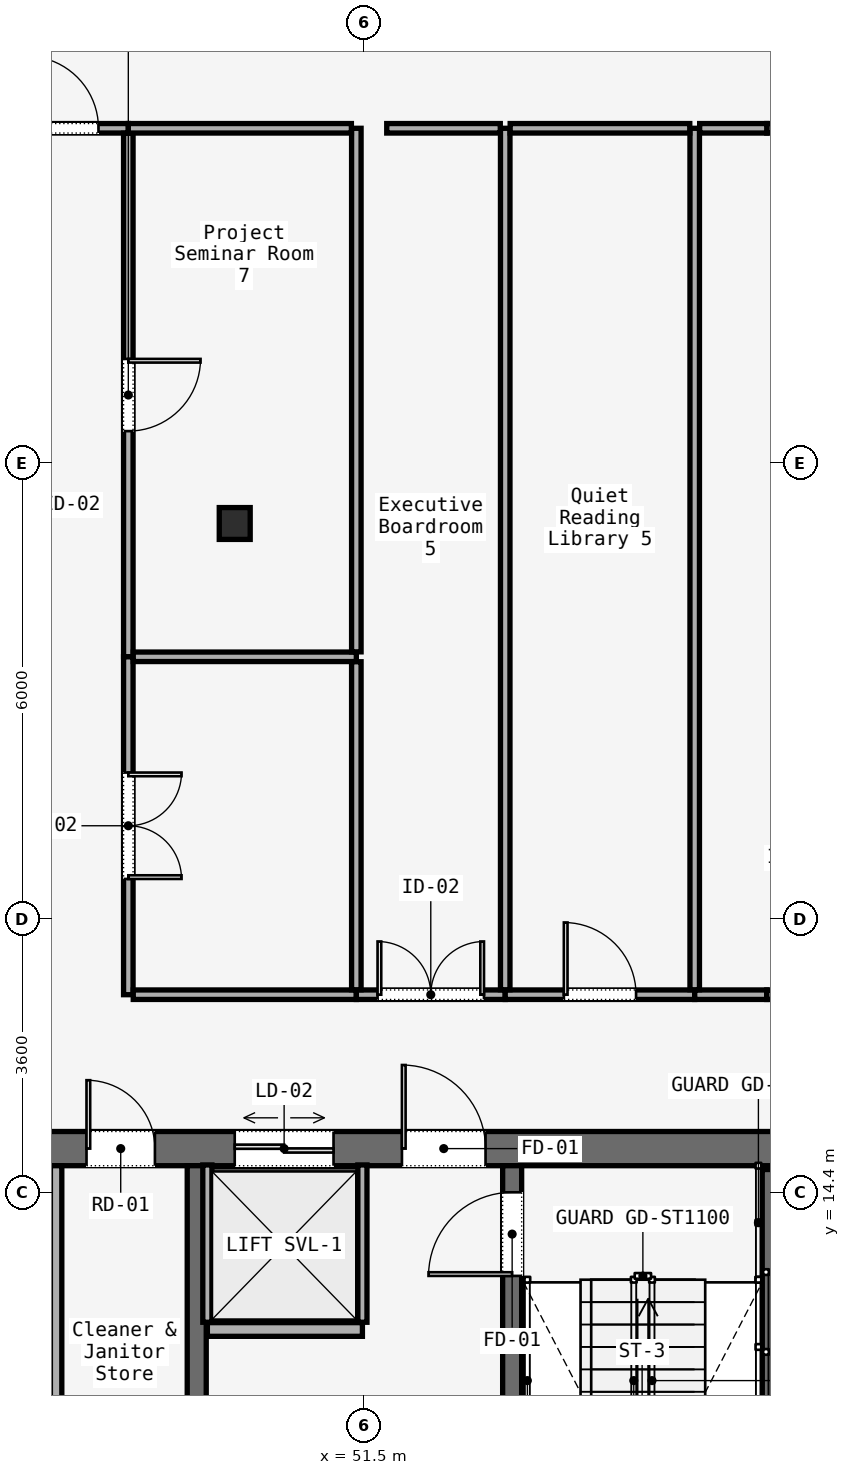
"""IFC4 building model, lengths in metres.
Left out: names, types, materials, properties, quantities, classifications, styles, units other than length and angle.
Written with IfcOpenShell. Run it as: python <this file> out.ifc"""

import sys

from ifc_helpers import new_model, si_unit, direction, frame, frame_2d, origin, origin_2d, place, context, subcontext, project, spatial, rectangle, i_section, extrude, element, fill, save


model = new_model("IFC4")
c1 = context("Model", 3, precision=1e-05, world=origin(), true_north=direction((0.0, 1.0)))
c2 = subcontext(c1, "Body", "Model", "MODEL_VIEW")
j1 = project(units=[si_unit("LENGTHUNIT", "METRE"), si_unit("PLANEANGLEUNIT", "RADIAN")], contexts=[c1])
p1 = place(None, origin())
s1 = spatial("IfcSite", under=j1, at=p1, CompositionType="ELEMENT")
p2 = place(p1, origin())
s2 = spatial("IfcBuilding", under=s1, at=p2, CompositionType="ELEMENT")
p3 = place(p2, frame((0.0, 0.0, 146.0)))
s3 = spatial("IfcBuildingStorey", under=s2, at=p3, CompositionType="ELEMENT", Elevation=146.0)
p4 = place(p3, frame((26.45, 14.975, 0.0), z_axis=(0.0, 0.0, 1.0), x_axis=(1.0, 0.0, 0.0)))
e1 = element("IfcWall", 1, at=p4, inside=s3, PredefinedType="SOLIDWALL", context=c2, shape_type="SweptSolid", body=[
    extrude(rectangle(XDim=31.1, YDim=0.45, at=frame_2d((15.55, 0.0))), origin(), (0.0, 0.0, 1.0), 3.58),
])
p5 = place(p4, frame((1.65, 0.0, 0.0)))
e2 = element("IfcOpeningElement", 2, at=p5, cuts=e1, PredefinedType="OPENING", context=c2, shape_type="SweptSolid", body=[
    extrude(rectangle(XDim=1.1, YDim=2.2, at=frame_2d((0.55, 1.1))), frame((0.0, 0.225, 0.0), z_axis=(0.0, -1.0, 0.0), x_axis=(1.0, 0.0, 0.0)), (0.0, 0.0, 1.0), 0.45),
])
p6 = place(p4, frame((13.65, 0.0, 0.0)))
e3 = element("IfcOpeningElement", 3, at=p6, cuts=e1, PredefinedType="OPENING", context=c2, shape_type="SweptSolid", body=[
    extrude(rectangle(XDim=1.1, YDim=2.2, at=frame_2d((0.55, 1.1))), frame((0.0, 0.225, 0.0), z_axis=(0.0, -1.0, 0.0), x_axis=(1.0, 0.0, 0.0)), (0.0, 0.0, 1.0), 0.45),
])
p7 = place(p4, frame((25.55, 0.0, 0.0)))
e4 = element("IfcOpeningElement", 4, at=p7, cuts=e1, PredefinedType="OPENING", context=c2, shape_type="SweptSolid", body=[
    extrude(rectangle(XDim=1.1, YDim=2.2, at=frame_2d((0.55, 1.1))), frame((0.0, 0.225, 0.0), z_axis=(0.0, -1.0, 0.0), x_axis=(1.0, 0.0, 0.0)), (0.0, 0.0, 1.0), 0.45),
])
p8 = place(p4, frame((10.7, 0.0, 0.0)))
e5 = element("IfcOpeningElement", 5, at=p8, cuts=e1, PredefinedType="OPENING", context=c2, shape_type="SweptSolid", body=[
    extrude(rectangle(XDim=1.4, YDim=2.2, at=frame_2d((0.7, 1.1))), frame((0.0, 0.225, 0.0), z_axis=(0.0, -1.0, 0.0), x_axis=(1.0, 0.0, 0.0)), (0.0, 0.0, 1.0), 0.45),
])
p9 = place(p4, frame((19.35, 0.0, 0.0)))
e6 = element("IfcOpeningElement", 6, at=p9, cuts=e1, PredefinedType="OPENING", context=c2, shape_type="SweptSolid", body=[
    extrude(rectangle(XDim=1.1, YDim=2.2, at=frame_2d((0.55, 1.1))), frame((0.0, 0.225, 0.0), z_axis=(0.0, -1.0, 0.0), x_axis=(1.0, 0.0, 0.0)), (0.0, 0.0, 1.0), 0.45),
])
p10 = place(p4, frame((21.4, 0.0, 0.0)))
e7 = element("IfcOpeningElement", 7, at=p10, cuts=e1, PredefinedType="OPENING", context=c2, shape_type="SweptSolid", body=[
    extrude(rectangle(XDim=0.9, YDim=2.1, at=frame_2d((0.45, 1.05))), frame((0.0, 0.225, 0.0), z_axis=(0.0, -1.0, 0.0), x_axis=(1.0, 0.0, 0.0)), (0.0, 0.0, 1.0), 0.45),
])
p11 = place(p4, frame((23.35, 0.0, 0.0)))
e8 = element("IfcOpeningElement", 8, at=p11, cuts=e1, PredefinedType="OPENING", context=c2, shape_type="SweptSolid", body=[
    extrude(rectangle(XDim=1.3, YDim=2.3, at=frame_2d((0.65, 1.15))), frame((0.0, 0.225, 0.0), z_axis=(0.0, -1.0, 0.0), x_axis=(1.0, 0.0, 0.0)), (0.0, 0.0, 1.0), 0.45),
])
p12 = place(p3, frame((49.3, 5.85, 0.0), z_axis=(0.0, 0.0, 1.0), x_axis=(0.0, 1.0, 0.0)))
e9 = element("IfcWall", 9, at=p12, inside=s3, PredefinedType="SOLIDWALL", context=c2, shape_type="SweptSolid", body=[
    extrude(rectangle(XDim=8.9, YDim=0.25, at=frame_2d((4.45, 0.0))), origin(), (0.0, 0.0, 1.0), 3.58),
])
p13 = place(p3, frame((53.45, 5.85, 0.0), z_axis=(0.0, 0.0, 1.0), x_axis=(0.0, 1.0, 0.0)))
e10 = element("IfcWall", 10, at=p13, inside=s3, PredefinedType="SOLIDWALL", context=c2, shape_type="SweptSolid", body=[
    extrude(rectangle(XDim=8.9, YDim=0.25, at=frame_2d((4.45, 0.0))), origin(), (0.0, 0.0, 1.0), 3.58),
])
p14 = place(p13, frame((7.45, 0.0, 0.0)))
e11 = element("IfcOpeningElement", 11, at=p14, cuts=e10, PredefinedType="OPENING", context=c2, shape_type="SweptSolid", body=[
    extrude(rectangle(XDim=1.1, YDim=2.2, at=frame_2d((0.55, 1.1))), frame((0.0, 0.125, 0.0), z_axis=(0.0, -1.0, 0.0), x_axis=(1.0, 0.0, 0.0)), (0.0, 0.0, 1.0), 0.25),
])
p15 = place(p3, frame((49.8, 23.2, 0.0), z_axis=(0.0, 0.0, 1.0), x_axis=(1.0, 0.0, 0.0)))
e12 = element("IfcColumn", 12, at=p15, inside=s3, PredefinedType="COLUMN", context=c2, shape_type="SweptSolid", body=[
    extrude(i_section(OverallWidth=0.407, OverallDepth=0.419, WebThickness=0.031, FlangeThickness=0.049, FilletRadius=0.015, at=origin_2d()), origin(), (0.0, 0.0, 1.0), 3.58),
])
p16 = place(p3, frame((56.84, 14.7, 0.0), z_axis=(0.0, 0.0, 1.0), x_axis=(0.0, -1.0, 0.0)))
e13 = element("IfcWall", 13, at=p16, inside=s3, PredefinedType="SOLIDWALL", context=c2, shape_type="SweptSolid", body=[
    extrude(rectangle(XDim=7.65, YDim=0.2, at=frame_2d((3.825, 0.0))), origin(), (0.0, 0.0, 1.0), 3.8),
])
p17 = place(p3, frame((47.45, 5.9, 0.0), z_axis=(0.0, 0.0, 1.0), x_axis=(0.0, 1.0, 0.0)))
e14 = element("IfcWall", 14, at=p17, inside=s3, PredefinedType="PARTITIONING", context=c2, shape_type="SweptSolid", body=[
    extrude(rectangle(XDim=8.85, YDim=0.15, at=frame_2d((4.425, 0.0))), origin(), (0.0, 0.0, 1.0), 3.01),
])
p18 = place(p17, frame((2.75, 0.0, 0.0)))
e15 = element("IfcOpeningElement", 15, at=p18, cuts=e14, PredefinedType="OPENING", context=c2, shape_type="SweptSolid", body=[
    extrude(rectangle(XDim=0.9, YDim=2.1, at=frame_2d((0.45, 1.05))), frame((0.0, 0.075, 0.0), z_axis=(0.0, -1.0, 0.0), x_axis=(1.0, 0.0, 0.0)), (0.0, 0.0, 1.0), 0.15),
])
p19 = place(p3, frame((49.44, 12.595, 0.0), z_axis=(0.0, 0.0, 1.0), x_axis=(1.0, 0.0, 0.0)))
e16 = element("IfcWall", 16, at=p19, inside=s3, PredefinedType="SOLIDWALL", context=c2, shape_type="SweptSolid", body=[
    extrude(rectangle(XDim=2.04, YDim=0.18, at=frame_2d((1.02, 0.0))), origin(), (0.0, 0.0, 1.0), 3.01),
])
for number, where, z_axis, x_axis in (
    (17, (49.44, 12.69, 0.0), (0.0, 0.0, 1.0), (0.0, 1.0, 0.0)),
    (18, (51.48, 12.69, 0.0), (0.0, 0.0, 1.0), (0.0, 1.0, 0.0)),
):
    element("IfcWall", number, at=place(p3, frame(where, z_axis=z_axis, x_axis=x_axis)), inside=s3, PredefinedType="SOLIDWALL", context=c2, shape_type="SweptSolid", body=[
        extrude(rectangle(XDim=2.07, YDim=0.12, at=frame_2d((1.035, 0.0))), origin(), (0.0, 0.0, 1.0), 3.01),
    ])
p20 = place(p3, frame((46.665, 28.4, 0.0), z_axis=(0.0, 0.0, 1.0), x_axis=(1.0, 0.0, 0.0)))
e19 = element("IfcWall", 19, at=p20, inside=s3, PredefinedType="PARTITIONING", context=c2, shape_type="SweptSolid", body=[
    extrude(rectangle(XDim=1.735, YDim=0.125, at=frame_2d((0.867, 0.0))), origin(), (0.0, 0.0, 1.0), 3.01),
])
p21 = place(p20, frame((0.393, 0.0, 0.0)))
e20 = element("IfcOpeningElement", 20, at=p21, cuts=e19, PredefinedType="OPENING", context=c2, shape_type="SweptSolid", body=[
    extrude(rectangle(XDim=0.95, YDim=2.2, at=frame_2d((0.475, 1.1))), frame((0.0, 0.062, 0.0), z_axis=(0.0, -1.0, 0.0), x_axis=(1.0, 0.0, 0.0)), (0.0, 0.0, 1.0), 0.125),
])
p22 = place(p3, frame((48.4, 28.335, 0.0), z_axis=(0.0, 0.0, 1.0), x_axis=(0.0, -1.0, 0.0)))
e21 = element("IfcWall", 21, at=p22, inside=s3, PredefinedType="PARTITIONING", context=c2, shape_type="SweptSolid", body=[
    extrude(rectangle(XDim=6.889, YDim=0.125, at=frame_2d((3.444, 0.0))), origin(), (0.0, 0.0, 1.0), 3.01),
])
p23 = place(p22, frame((2.969, 0.0, 0.0)))
e22 = element("IfcOpeningElement", 22, at=p23, cuts=e21, PredefinedType="OPENING", context=c2, shape_type="SweptSolid", body=[
    extrude(rectangle(XDim=0.95, YDim=2.2, at=frame_2d((0.475, 1.1))), frame((0.0, 0.062, 0.0), z_axis=(0.0, -1.0, 0.0), x_axis=(1.0, 0.0, 0.0)), (0.0, 0.0, 1.0), 0.125),
])
p24 = place(p3, frame((48.4, 21.446, 0.0), z_axis=(0.0, 0.0, 1.0), x_axis=(0.0, -1.0, 0.0)))
e23 = element("IfcWall", 23, at=p24, inside=s3, PredefinedType="PARTITIONING", context=c2, shape_type="SweptSolid", body=[
    extrude(rectangle(XDim=4.446, YDim=0.125, at=frame_2d((2.223, 0.0))), origin(), (0.0, 0.0, 1.0), 3.01),
])
p25 = place(p24, frame((1.523, 0.0, 0.0)))
e24 = element("IfcOpeningElement", 24, at=p25, cuts=e23, PredefinedType="OPENING", context=c2, shape_type="SweptSolid", body=[
    extrude(rectangle(XDim=1.4, YDim=2.2, at=frame_2d((0.7, 1.1))), frame((0.0, 0.062, 0.0), z_axis=(0.0, -1.0, 0.0), x_axis=(1.0, 0.0, 0.0)), (0.0, 0.0, 1.0), 0.125),
])
p26 = place(p3, frame((48.465, 17.0, 0.0), z_axis=(0.0, 0.0, 1.0), x_axis=(1.0, 0.0, 0.0)))
e25 = element("IfcWall", 25, at=p26, inside=s3, PredefinedType="PARTITIONING", context=c2, shape_type="SweptSolid", body=[
    extrude(rectangle(XDim=2.935, YDim=0.125, at=frame_2d((1.467, 0.0))), origin(), (0.0, 0.0, 1.0), 3.01),
])
p27 = place(p3, frame((51.4, 17.0, 0.0), z_axis=(0.0, 0.0, 1.0), x_axis=(1.0, 0.0, 0.0)))
e26 = element("IfcWall", 26, at=p27, inside=s3, PredefinedType="PARTITIONING", context=c2, shape_type="SweptSolid", body=[
    extrude(rectangle(XDim=1.959, YDim=0.125, at=frame_2d((0.979, 0.0))), origin(), (0.0, 0.0, 1.0), 3.01),
])
p28 = place(p27, frame((0.279, 0.0, 0.0)))
e27 = element("IfcOpeningElement", 27, at=p28, cuts=e26, PredefinedType="OPENING", context=c2, shape_type="SweptSolid", body=[
    extrude(rectangle(XDim=1.4, YDim=2.2, at=frame_2d((0.7, 1.1))), frame((0.0, 0.062, 0.0), z_axis=(0.0, -1.0, 0.0), x_axis=(1.0, 0.0, 0.0)), (0.0, 0.0, 1.0), 0.125),
])
p29 = place(p3, frame((53.359, 17.0, 0.0), z_axis=(0.0, 0.0, 1.0), x_axis=(1.0, 0.0, 0.0)))
e28 = element("IfcWall", 28, at=p29, inside=s3, PredefinedType="PARTITIONING", context=c2, shape_type="SweptSolid", body=[
    extrude(rectangle(XDim=2.493, YDim=0.125, at=frame_2d((1.247, 0.0))), origin(), (0.0, 0.0, 1.0), 3.01),
])
p30 = place(p29, frame((0.771, 0.0, 0.0)))
e29 = element("IfcOpeningElement", 29, at=p30, cuts=e28, PredefinedType="OPENING", context=c2, shape_type="SweptSolid", body=[
    extrude(rectangle(XDim=0.95, YDim=2.2, at=frame_2d((0.475, 1.1))), frame((0.0, 0.062, 0.0), z_axis=(0.0, -1.0, 0.0), x_axis=(1.0, 0.0, 0.0)), (0.0, 0.0, 1.0), 0.125),
])
p31 = place(p3, frame((55.852, 17.0, 0.0), z_axis=(0.0, 0.0, 1.0), x_axis=(1.0, 0.0, 0.0)))
e30 = element("IfcWall", 30, at=p31, inside=s3, PredefinedType="PARTITIONING", context=c2, shape_type="SweptSolid", body=[
    extrude(rectangle(XDim=0.948, YDim=0.125, at=frame_2d((0.474, 0.0))), origin(), (0.0, 0.0, 1.0), 3.01),
])
p32 = place(p3, frame((56.8, 17.0, 0.0), z_axis=(0.0, 0.0, 1.0), x_axis=(1.0, 0.0, 0.0)))
e31 = element("IfcWall", 31, at=p32, inside=s3, PredefinedType="PARTITIONING", context=c2, shape_type="SweptSolid", body=[
    extrude(rectangle(XDim=1.535, YDim=0.125, at=frame_2d((0.768, 0.0))), origin(), (0.0, 0.0, 1.0), 3.01),
])
p33 = place(p32, frame((0.292, 0.0, 0.0)))
e32 = element("IfcOpeningElement", 32, at=p33, cuts=e31, PredefinedType="OPENING", context=c2, shape_type="SweptSolid", body=[
    extrude(rectangle(XDim=0.95, YDim=2.2, at=frame_2d((0.475, 1.1))), frame((0.0, 0.062, 0.0), z_axis=(0.0, -1.0, 0.0), x_axis=(1.0, 0.0, 0.0)), (0.0, 0.0, 1.0), 0.125),
])
p34 = place(p3, frame((48.465, 21.446, 0.0), z_axis=(0.0, 0.0, 1.0), x_axis=(1.0, 0.0, 0.0)))
e33 = element("IfcWall", 33, at=p34, inside=s3, PredefinedType="PARTITIONING", context=c2, shape_type="SweptSolid", body=[
    extrude(rectangle(XDim=2.935, YDim=0.125, at=frame_2d((1.467, 0.0))), origin(), (0.0, 0.0, 1.0), 3.01),
])
p35 = place(p3, frame((51.4, 21.381, 0.0), z_axis=(0.0, 0.0, 1.0), x_axis=(0.0, -1.0, 0.0)))
e34 = element("IfcWall", 34, at=p35, inside=s3, PredefinedType="PARTITIONING", context=c2, shape_type="SweptSolid", body=[
    extrude(rectangle(XDim=4.316, YDim=0.125, at=frame_2d((2.158, 0.0))), origin(), (0.0, 0.0, 1.0), 3.01),
])
p36 = place(p3, frame((56.8, 28.4, 0.0), z_axis=(0.0, 0.0, 1.0), x_axis=(1.0, 0.0, 0.0)))
e35 = element("IfcWall", 35, at=p36, inside=s3, PredefinedType="PARTITIONING", context=c2, shape_type="SweptSolid", body=[
    extrude(rectangle(XDim=1.301, YDim=0.125, at=frame_2d((0.651, 0.0))), origin(), (0.0, 0.0, 1.0), 3.01),
])
p37 = place(p3, frame((55.852, 17.065, 0.0), z_axis=(0.0, 0.0, 1.0), x_axis=(0.0, 1.0, 0.0)))
e36 = element("IfcWall", 36, at=p37, inside=s3, PredefinedType="PARTITIONING", context=c2, shape_type="SweptSolid", body=[
    extrude(rectangle(XDim=11.335, YDim=0.125, at=frame_2d((5.667, 0.0))), origin(), (0.0, 0.0, 1.0), 3.01),
])
p38 = place(p3, frame((55.917, 28.4, 0.0), z_axis=(0.0, 0.0, 1.0), x_axis=(1.0, 0.0, 0.0)))
e37 = element("IfcWall", 37, at=p38, inside=s3, PredefinedType="PARTITIONING", context=c2, shape_type="SweptSolid", body=[
    extrude(rectangle(XDim=0.883, YDim=0.125, at=frame_2d((0.441, 0.0))), origin(), (0.0, 0.0, 1.0), 3.01),
])
p39 = place(p3, frame((53.359, 28.4, 0.0), z_axis=(0.0, 0.0, 1.0), x_axis=(0.0, -1.0, 0.0)))
e38 = element("IfcWall", 38, at=p39, inside=s3, PredefinedType="PARTITIONING", context=c2, shape_type="SweptSolid", body=[
    extrude(rectangle(XDim=11.335, YDim=0.125, at=frame_2d((5.667, 0.0))), origin(), (0.0, 0.0, 1.0), 3.01),
])
p40 = place(p3, frame((51.4, 21.511, 0.0), z_axis=(0.0, 0.0, 1.0), x_axis=(0.0, 1.0, 0.0)))
e39 = element("IfcWall", 39, at=p40, inside=s3, PredefinedType="PARTITIONING", context=c2, shape_type="SweptSolid", body=[
    extrude(rectangle(XDim=6.889, YDim=0.125, at=frame_2d((3.444, 0.0))), origin(), (0.0, 0.0, 1.0), 3.01),
])
p41 = place(p3, frame((51.8, 28.4, 0.0), z_axis=(0.0, 0.0, 1.0), x_axis=(1.0, 0.0, 0.0)))
e40 = element("IfcWall", 40, at=p41, inside=s3, PredefinedType="PARTITIONING", context=c2, shape_type="SweptSolid", body=[
    extrude(rectangle(XDim=1.494, YDim=0.125, at=frame_2d((0.747, 0.0))), origin(), (0.0, 0.0, 1.0), 3.01),
])
p42 = place(p3, frame((53.424, 28.4, 0.0), z_axis=(0.0, 0.0, 1.0), x_axis=(1.0, 0.0, 0.0)))
e41 = element("IfcWall", 41, at=p42, inside=s3, PredefinedType="PARTITIONING", context=c2, shape_type="SweptSolid", body=[
    extrude(rectangle(XDim=2.363, YDim=0.125, at=frame_2d((1.182, 0.0))), origin(), (0.0, 0.0, 1.0), 3.01),
])
p43 = place(p3, frame((48.4, 28.4, 0.0), z_axis=(0.0, 0.0, 1.0), x_axis=(1.0, 0.0, 0.0)))
e42 = element("IfcWall", 42, at=p43, inside=s3, PredefinedType="PARTITIONING", context=c2, shape_type="SweptSolid", body=[
    extrude(rectangle(XDim=2.935, YDim=0.125, at=frame_2d((1.468, 0.0))), origin(), (0.0, 0.0, 1.0), 3.01),
])
p44 = place(p7, origin())
e43 = element("IfcDoor", 43, at=p44, inside=s3, OperationType="SINGLE_SWING_RIGHT", PredefinedType="DOOR", context=c2, shape_type="SweptSolid", body=[
    extrude(rectangle(XDim=1.1, YDim=2.2, at=frame_2d((0.55, 1.1))), frame((0.0, 0.025, 0.0), z_axis=(0.0, -1.0, 0.0), x_axis=(1.0, 0.0, 0.0)), (0.0, 0.0, 1.0), 0.05),
])
fill(e4, e43)
p45 = place(p10, origin())
e44 = element("IfcDoor", 44, at=p45, inside=s3, OperationType="SINGLE_SWING_LEFT", PredefinedType="DOOR", context=c2, shape_type="SweptSolid", body=[
    extrude(rectangle(XDim=0.9, YDim=2.1, at=frame_2d((0.45, 1.05))), frame((0.0, 0.025, 0.0), z_axis=(0.0, -1.0, 0.0), x_axis=(1.0, 0.0, 0.0)), (0.0, 0.0, 1.0), 0.05),
])
fill(e7, e44)
p46 = place(p14, origin())
e45 = element("IfcDoor", 45, at=p46, inside=s3, OperationType="SINGLE_SWING_LEFT", PredefinedType="DOOR", context=c2, shape_type="SweptSolid", body=[
    extrude(rectangle(XDim=1.1, YDim=2.2, at=frame_2d((0.55, 1.1))), frame((0.0, 0.025, 0.0), z_axis=(0.0, -1.0, 0.0), x_axis=(1.0, 0.0, 0.0)), (0.0, 0.0, 1.0), 0.05),
])
fill(e11, e45)
p47 = place(p11, origin())
e46 = element("IfcDoor", 46, at=p47, inside=s3, OperationType="DOUBLE_DOOR_SLIDING", PredefinedType="DOOR", context=c2, shape_type="SweptSolid", body=[
    extrude(rectangle(XDim=1.3, YDim=2.3, at=frame_2d((0.65, 1.15))), frame((0.0, 0.025, 0.0), z_axis=(0.0, -1.0, 0.0), x_axis=(1.0, 0.0, 0.0)), (0.0, 0.0, 1.0), 0.05),
])
fill(e8, e46)
p48 = place(p25, origin())
e47 = element("IfcDoor", 47, at=p48, inside=s3, OperationType="SINGLE_SWING_RIGHT", PredefinedType="DOOR", context=c2, shape_type="SweptSolid", body=[
    extrude(rectangle(XDim=1.4, YDim=2.2, at=frame_2d((0.7, 1.1))), frame((0.0, 0.025, 0.0), z_axis=(0.0, -1.0, 0.0), x_axis=(1.0, 0.0, 0.0)), (0.0, 0.0, 1.0), 0.05),
])
fill(e24, e47)
p49 = place(p28, origin())
e48 = element("IfcDoor", 48, at=p49, inside=s3, OperationType="SINGLE_SWING_LEFT", PredefinedType="DOOR", context=c2, shape_type="SweptSolid", body=[
    extrude(rectangle(XDim=1.4, YDim=2.2, at=frame_2d((0.7, 1.1))), frame((0.0, 0.025, 0.0), z_axis=(0.0, -1.0, 0.0), x_axis=(1.0, 0.0, 0.0)), (0.0, 0.0, 1.0), 0.05),
])
fill(e27, e48)
p50 = place(p30, origin())
e49 = element("IfcDoor", 49, at=p50, inside=s3, OperationType="SINGLE_SWING_RIGHT", PredefinedType="DOOR", context=c2, shape_type="SweptSolid", body=[
    extrude(rectangle(XDim=0.95, YDim=2.2, at=frame_2d((0.475, 1.1))), frame((0.0, 0.025, 0.0), z_axis=(0.0, -1.0, 0.0), x_axis=(1.0, 0.0, 0.0)), (0.0, 0.0, 1.0), 0.05),
])
fill(e29, e49)
p51 = place(p23, origin())
e50 = element("IfcDoor", 50, at=p51, inside=s3, OperationType="SINGLE_SWING_RIGHT", PredefinedType="DOOR", context=c2, shape_type="SweptSolid", body=[
    extrude(rectangle(XDim=0.95, YDim=2.2, at=frame_2d((0.475, 1.1))), frame((0.0, 0.025, 0.0), z_axis=(0.0, -1.0, 0.0), x_axis=(1.0, 0.0, 0.0)), (0.0, 0.0, 1.0), 0.05),
])
fill(e22, e50)
p52 = place(p21, origin())
e51 = element("IfcDoor", 51, at=p52, inside=s3, OperationType="SINGLE_SWING_LEFT", PredefinedType="DOOR", context=c2, shape_type="SweptSolid", body=[
    extrude(rectangle(XDim=0.95, YDim=2.2, at=frame_2d((0.475, 1.1))), frame((0.0, 0.025, 0.0), z_axis=(0.0, -1.0, 0.0), x_axis=(1.0, 0.0, 0.0)), (0.0, 0.0, 1.0), 0.05),
])
fill(e20, e51)
save(model, sys.argv[1])
